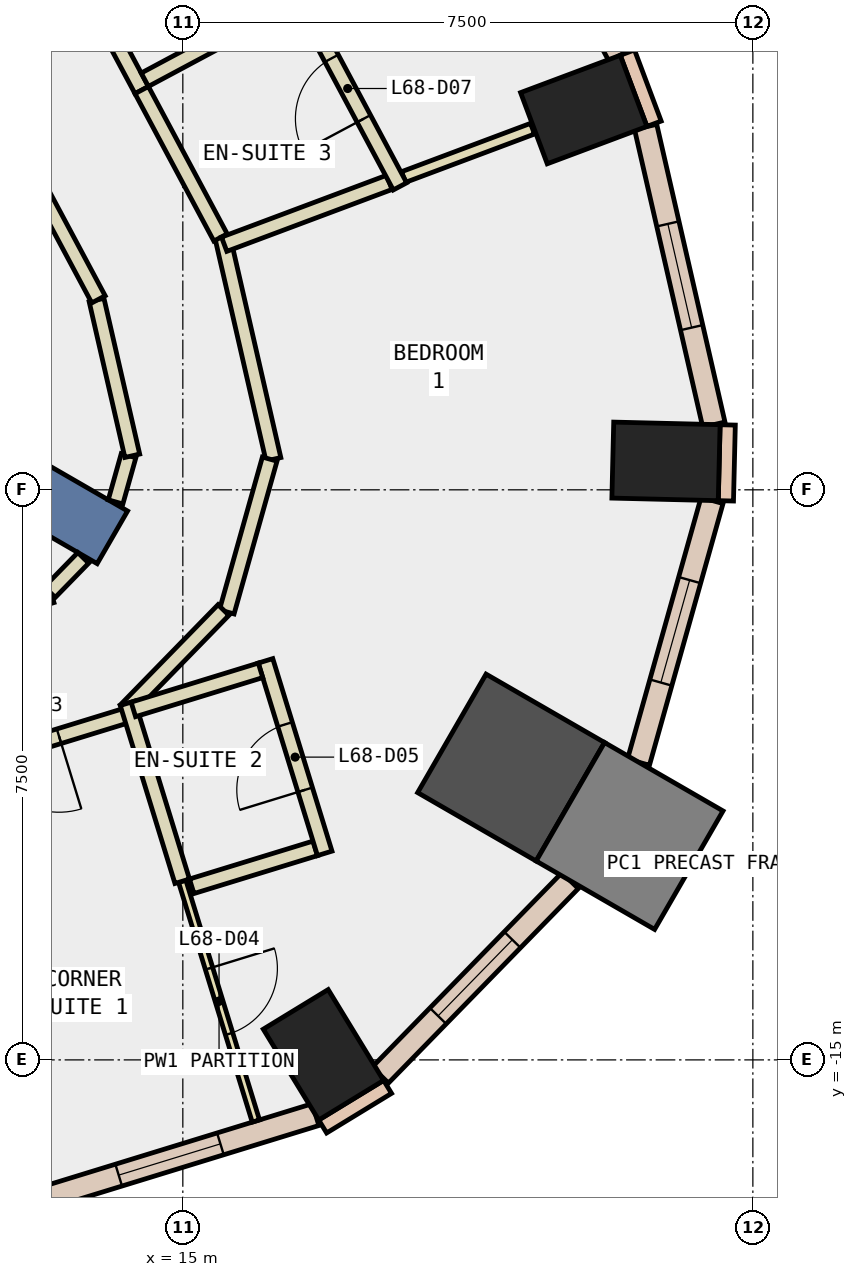
"""IFC4 building model, lengths in metres.
Left out: names, types, materials, properties, quantities, classifications, styles, units other than length and angle.
Written with IfcOpenShell. Run it as: python <this file> out.ifc"""

import sys

from ifc_helpers import new_model, si_unit, direction, frame, frame_2d, origin, origin_2d, place, context, subcontext, project, spatial, rectangle, extrude, element, fill, save


model = new_model("IFC4")
c1 = context("Model", 3, precision=1e-05, world=origin(), true_north=direction((0.0, 1.0)))
c2 = subcontext(c1, "Body", "Model", "MODEL_VIEW")
j1 = project(units=[si_unit("LENGTHUNIT", "METRE"), si_unit("PLANEANGLEUNIT", "RADIAN")], contexts=[c1])
p1 = place(None, origin())
s1 = spatial("IfcSite", under=j1, at=p1, CompositionType="ELEMENT")
p2 = place(p1, origin())
s2 = spatial("IfcBuilding", under=s1, at=p2, CompositionType="ELEMENT")
p3 = place(p2, frame((0.0, 0.0, 293.6)))
s3 = spatial("IfcBuildingStorey", under=s2, at=p3, CompositionType="ELEMENT", Elevation=293.6)
p4 = place(p3, frame((16.85, -14.933, -0.34), z_axis=(0.0, 0.0, 1.0), x_axis=(0.853650808213, 0.520845752251, 0.0)))
e1 = element("IfcColumn", 1, at=p4, inside=s3, PredefinedType="COLUMN", context=c2, shape_type="SweptSolid", body=[
    extrude(rectangle(XDim=1.0, YDim=1.4, at=origin_2d()), origin(), (0.0, 0.0, 1.0), 3.6),
])
p5 = place(p3, frame((19.319, -11.154, -0.34), z_axis=(0.0, 0.0, 1.0), x_axis=(-0.866025403784, 0.5, 0.0)))
e2 = element("IfcColumn", 2, at=p5, inside=s3, PredefinedType="COLUMN", context=c2, shape_type="SweptSolid", body=[
    extrude(rectangle(XDim=1.8, YDim=1.8, at=origin_2d()), origin(), (0.0, 0.0, 1.0), 3.6),
])
for number, where, z_axis, x_axis in (
    (3, (21.357, -7.126, -0.34), (0.0, 0.0, 1.0), (0.024, 1.0, 0.0)),
    (4, (20.275, -2.497, -0.34), (0.0, 0.0, 1.0), (-0.351, 0.936, 0.0)),
):
    element("IfcColumn", number, at=place(p3, frame(where, z_axis=z_axis, x_axis=x_axis)), inside=s3, PredefinedType="COLUMN", context=c2, shape_type="SweptSolid", body=[
        extrude(rectangle(XDim=1.0, YDim=1.4, at=origin_2d()), origin(), (0.0, 0.0, 1.0), 3.6),
    ])
p6 = place(p3, frame((20.878, -12.054, -0.34), z_axis=(0.0, 0.0, 1.0), x_axis=(-0.866025403784, 0.5, 0.0)))
e5 = element("IfcColumn", 5, at=p6, inside=s3, PredefinedType="COLUMN", context=c2, shape_type="SweptSolid", body=[
    extrude(rectangle(XDim=1.8, YDim=1.8, at=origin_2d()), origin(), (0.0, 0.0, 1.0), 3.6),
])
p7 = place(p3, frame((6.279, -3.625, -0.34), z_axis=(0.0, 0.0, 1.0), x_axis=(0.866017533419, -0.500013631625, 0.0)))
e6 = element("IfcWall", 6, at=p7, inside=s3, PredefinedType="SHEAR", context=c2, shape_type="SweptSolid", body=[
    extrude(rectangle(XDim=9.0, YDim=0.8, at=frame_2d((4.5, 0.0))), origin(), (0.0, 0.0, 1.0), 3.6),
])
p8 = place(p3, frame((21.2, -2.684, 0.0), z_axis=(0.0, 0.0, 1.0), x_axis=(-0.350962844851, 0.936389385637, 0.0)))
e7 = element("IfcWall", 7, at=p8, inside=s3, PredefinedType="STANDARD", context=c2, shape_type="SweptSolid", body=[
    extrude(rectangle(XDim=1.0, YDim=0.2, at=frame_2d((0.5, 0.0))), origin(), (0.0, 0.0, 1.0), 3.26),
])
p9 = place(p3, frame((16.84, -15.876, 0.0), z_axis=(0.0, 0.0, 1.0), x_axis=(0.853679739553, 0.520798331677, 0.0)))
e8 = element("IfcWall", 8, at=p9, inside=s3, PredefinedType="STANDARD", context=c2, shape_type="SweptSolid", body=[
    extrude(rectangle(XDim=1.0, YDim=0.2, at=frame_2d((0.5, 0.0))), origin(), (0.0, 0.0, 1.0), 3.26),
])
p10 = place(p3, frame((22.145, -7.645, 0.0), z_axis=(0.0, 0.0, 1.0), x_axis=(0.023942303888, 0.999713341956, 0.0)))
e9 = element("IfcWall", 9, at=p10, inside=s3, PredefinedType="STANDARD", context=c2, shape_type="SweptSolid", body=[
    extrude(rectangle(XDim=0.999, YDim=0.2, at=frame_2d((0.5, 0.0))), origin(), (0.0, 0.0, 1.0), 3.26),
])
p11 = place(p3, frame((12.904, -16.901, 0.0), z_axis=(0.0, 0.0, 1.0), x_axis=(0.955866957005, 0.293799864716, 0.0)))
e10 = element("IfcWall", 10, at=p11, inside=s3, PredefinedType="STANDARD", context=c2, shape_type="SweptSolid", body=[
    extrude(rectangle(XDim=4.02, YDim=0.3, at=frame_2d((2.01, 0.0))), origin(), (0.0, 0.0, 1.0), 3.26),
])
p12 = place(p11, frame((1.31, 0.0, 0.9)))
e11 = element("IfcOpeningElement", 11, at=p12, cuts=e10, PredefinedType="OPENING", context=c2, shape_type="SweptSolid", body=[
    extrude(rectangle(XDim=1.4, YDim=2.0, at=frame_2d((0.7, 1.0))), frame((0.0, 0.16, 0.0), z_axis=(0.0, -1.0, 0.0), x_axis=(1.0, 0.0, 0.0)), (0.0, 0.0, 1.0), 0.32),
])
p13 = place(p3, frame((17.598, -15.2, 0.0), z_axis=(0.0, 0.0, 1.0), x_axis=(0.698555868355, 0.715555517614, 0.0)))
e12 = element("IfcWall", 12, at=p13, inside=s3, PredefinedType="STANDARD", context=c2, shape_type="SweptSolid", body=[
    extrude(rectangle(XDim=3.576, YDim=0.3, at=frame_2d((1.788, 0.0))), origin(), (0.0, 0.0, 1.0), 3.26),
])
p14 = place(p13, frame((1.088, 0.0, 0.9)))
e13 = element("IfcOpeningElement", 13, at=p14, cuts=e12, PredefinedType="OPENING", context=c2, shape_type="SweptSolid", body=[
    extrude(rectangle(XDim=1.4, YDim=2.0, at=frame_2d((0.7, 1.0))), frame((0.0, 0.16, 0.0), z_axis=(0.0, -1.0, 0.0), x_axis=(1.0, 0.0, 0.0)), (0.0, 0.0, 1.0), 0.32),
])
p15 = place(p3, frame((20.995, -11.083, 0.0), z_axis=(0.0, 0.0, 1.0), x_axis=(0.270589405397, 0.962694849725, 0.0)))
e14 = element("IfcWall", 14, at=p15, inside=s3, PredefinedType="STANDARD", context=c2, shape_type="SweptSolid", body=[
    extrude(rectangle(XDim=3.577, YDim=0.3, at=frame_2d((1.788, 0.0))), origin(), (0.0, 0.0, 1.0), 3.26),
])
p16 = place(p15, frame((1.088, 0.0, 0.9)))
e15 = element("IfcOpeningElement", 15, at=p16, cuts=e14, PredefinedType="OPENING", context=c2, shape_type="SweptSolid", body=[
    extrude(rectangle(XDim=1.4, YDim=2.0, at=frame_2d((0.7, 1.0))), frame((0.0, 0.16, 0.0), z_axis=(0.0, -1.0, 0.0), x_axis=(1.0, 0.0, 0.0)), (0.0, 0.0, 1.0), 0.32),
])
p17 = place(p3, frame((21.987, -6.642, 0.0), z_axis=(0.0, 0.0, 1.0), x_axis=(-0.223448307338, 0.974715781112, 0.0)))
e16 = element("IfcWall", 16, at=p17, inside=s3, PredefinedType="STANDARD", context=c2, shape_type="SweptSolid", body=[
    extrude(rectangle(XDim=4.019, YDim=0.3, at=frame_2d((2.009, 0.0))), origin(), (0.0, 0.0, 1.0), 3.26),
])
p18 = place(p17, frame((1.309, 0.0, 0.9)))
e17 = element("IfcOpeningElement", 17, at=p18, cuts=e16, PredefinedType="OPENING", context=c2, shape_type="SweptSolid", body=[
    extrude(rectangle(XDim=1.4, YDim=2.0, at=frame_2d((0.7, 1.0))), frame((0.0, 0.16, 0.0), z_axis=(0.0, -1.0, 0.0), x_axis=(1.0, 0.0, 0.0)), (0.0, 0.0, 1.0), 0.32),
])
p19 = place(p3, frame((20.739, -1.79, 0.0), z_axis=(0.0, 0.0, 1.0), x_axis=(-0.471789353675, 0.881711293882, 0.0)))
e18 = element("IfcWall", 18, at=p19, inside=s3, PredefinedType="STANDARD", context=c2, shape_type="SweptSolid", body=[
    extrude(rectangle(XDim=7.277, YDim=0.3, at=frame_2d((3.638, 0.0))), origin(), (0.0, 0.0, 1.0), 3.26),
])
p20 = place(p19, frame((0.719, 0.0, 0.9)))
e19 = element("IfcOpeningElement", 19, at=p20, cuts=e18, PredefinedType="OPENING", context=c2, shape_type="SweptSolid", body=[
    extrude(rectangle(XDim=2.2, YDim=2.0, at=frame_2d((1.1, 1.0))), frame((0.0, 0.16, 0.0), z_axis=(0.0, -1.0, 0.0), x_axis=(1.0, 0.0, 0.0)), (0.0, 0.0, 1.0), 0.32),
])
p21 = place(p19, frame((4.358, 0.0, 0.9)))
e20 = element("IfcOpeningElement", 20, at=p21, cuts=e18, PredefinedType="OPENING", context=c2, shape_type="SweptSolid", body=[
    extrude(rectangle(XDim=2.2, YDim=2.0, at=frame_2d((1.1, 1.0))), frame((0.0, 0.16, 0.0), z_axis=(0.0, -1.0, 0.0), x_axis=(1.0, 0.0, 0.0)), (0.0, 0.0, 1.0), 0.32),
])
p22 = place(p3, frame((11.239, -9.514, 0.0), z_axis=(0.0, 0.0, 1.0), x_axis=(0.955838469047, 0.293892533234, 0.0)))
e21 = element("IfcWall", 21, at=p22, inside=s3, PredefinedType="PARTITIONING", context=c2, shape_type="SweptSolid", body=[
    extrude(rectangle(XDim=2.13, YDim=0.2, at=frame_2d((1.065, 0.0))), origin(), (0.0, 0.0, 1.0), 3.26),
])
p23 = place(p3, frame((13.25, -8.846, 0.0), z_axis=(0.0, 0.0, 1.0), x_axis=(0.698333537371, 0.715772499181, 0.0)))
e22 = element("IfcWall", 22, at=p23, inside=s3, PredefinedType="PARTITIONING", context=c2, shape_type="SweptSolid", body=[
    extrude(rectangle(XDim=0.63, YDim=0.2, at=frame_2d((0.315, 0.0))), origin(), (0.0, 0.0, 1.0), 3.26),
])
p24 = place(p3, frame((14.115, -7.659, 0.0), z_axis=(0.0, 0.0, 1.0), x_axis=(0.270633612894, 0.96268242301, 0.0)))
e23 = element("IfcWall", 23, at=p24, inside=s3, PredefinedType="PARTITIONING", context=c2, shape_type="SweptSolid", body=[
    extrude(rectangle(XDim=0.632, YDim=0.2, at=frame_2d((0.316, 0.0))), origin(), (0.0, 0.0, 1.0), 3.26),
])
p25 = place(p3, frame((14.335, -7.052, 0.0), z_axis=(0.0, 0.0, 1.0), x_axis=(-0.22355315143, 0.974691740237, 0.0)))
e24 = element("IfcWall", 24, at=p25, inside=s3, PredefinedType="PARTITIONING", context=c2, shape_type="SweptSolid", body=[
    extrude(rectangle(XDim=2.102, YDim=0.2, at=frame_2d((1.051, 0.0))), origin(), (0.0, 0.0, 1.0), 3.26),
])
p26 = place(p3, frame((13.89, -4.994, 0.0), z_axis=(0.0, 0.0, 1.0), x_axis=(-0.471713767504, 0.881751734644, 0.0)))
e25 = element("IfcWall", 25, at=p26, inside=s3, PredefinedType="PARTITIONING", context=c2, shape_type="SweptSolid", body=[
    extrude(rectangle(XDim=7.248, YDim=0.2, at=frame_2d((3.624, 0.0))), origin(), (0.0, 0.0, 1.0), 3.26),
])
p27 = place(p26, frame((2.724, 0.0, 0.0)))
e26 = element("IfcOpeningElement", 26, at=p27, cuts=e25, PredefinedType="OPENING", context=c2, shape_type="SweptSolid", body=[
    extrude(rectangle(XDim=1.8, YDim=2.1, at=frame_2d((0.9, 1.05))), frame((0.0, 0.11, 0.0), z_axis=(0.0, -1.0, 0.0), x_axis=(1.0, 0.0, 0.0)), (0.0, 0.0, 1.0), 0.22),
])
p28 = place(p3, frame((14.243, -10.474, 0.0), z_axis=(0.0, 0.0, 1.0), x_axis=(-0.955937788993, -0.293569316475, 0.0)))
e27 = element("IfcWall", 27, at=p28, inside=s3, PredefinedType="PARTITIONING", context=c2, shape_type="SweptSolid", body=[
    extrude(rectangle(XDim=2.823, YDim=0.2, at=frame_2d((1.412, 0.0))), origin(), (0.0, 0.0, 1.0), 3.26),
])
p29 = place(p28, frame((0.912, 0.0, 0.0)))
e28 = element("IfcOpeningElement", 28, at=p29, cuts=e27, PredefinedType="OPENING", context=c2, shape_type="SweptSolid", body=[
    extrude(rectangle(XDim=1.0, YDim=2.1, at=frame_2d((0.5, 1.05))), frame((0.0, 0.11, 0.0), z_axis=(0.0, -1.0, 0.0), x_axis=(1.0, 0.0, 0.0)), (0.0, 0.0, 1.0), 0.22),
])
p30 = place(p3, frame((15.521, -4.171, 0.0), z_axis=(0.0, 0.0, 1.0), x_axis=(0.223416387785, -0.974723097946, 0.0)))
e29 = element("IfcWall", 29, at=p30, inside=s3, PredefinedType="PARTITIONING", context=c2, shape_type="SweptSolid", body=[
    extrude(rectangle(XDim=3.003, YDim=0.2, at=frame_2d((1.501, 0.0))), origin(), (0.0, 0.0, 1.0), 3.26),
])
p31 = place(p3, frame((16.143, -7.096, 0.0), z_axis=(0.0, 0.0, 1.0), x_axis=(-0.270688011946, -0.962667128445, 0.0)))
e30 = element("IfcWall", 30, at=p31, inside=s3, PredefinedType="PARTITIONING", context=c2, shape_type="SweptSolid", body=[
    extrude(rectangle(XDim=2.088, YDim=0.2, at=frame_2d((1.044, 0.0))), origin(), (0.0, 0.0, 1.0), 3.26),
])
p32 = place(p3, frame((15.535, -9.081, 0.0), z_axis=(0.0, 0.0, 1.0), x_axis=(-0.698342132704, -0.715764113162, 0.0)))
e31 = element("IfcWall", 31, at=p32, inside=s3, PredefinedType="PARTITIONING", context=c2, shape_type="SweptSolid", body=[
    extrude(rectangle(XDim=1.836, YDim=0.2, at=frame_2d((0.918, 0.0))), origin(), (0.0, 0.0, 1.0), 3.26),
])
p33 = place(p3, frame((12.009, 2.338, 0.0), z_axis=(0.0, 0.0, 1.0), x_axis=(0.471771260231, -0.88172097515, 0.0)))
e32 = element("IfcWall", 32, at=p33, inside=s3, PredefinedType="PARTITIONING", context=c2, shape_type="SweptSolid", body=[
    extrude(rectangle(XDim=5.193, YDim=0.2, at=frame_2d((2.597, 0.0))), origin(), (0.0, 0.0, 1.0), 3.26),
])
p34 = place(p33, frame((2.146, 0.0, 0.0)))
e33 = element("IfcOpeningElement", 33, at=p34, cuts=e32, PredefinedType="OPENING", context=c2, shape_type="SweptSolid", body=[
    extrude(rectangle(XDim=1.0, YDim=2.1, at=frame_2d((0.5, 1.05))), frame((0.0, 0.11, 0.0), z_axis=(0.0, -1.0, 0.0), x_axis=(1.0, 0.0, 0.0)), (0.0, 0.0, 1.0), 0.22),
])
p35 = place(p3, frame((14.459, -2.241, 0.0), z_axis=(0.0, 0.0, 1.0), x_axis=(0.471648235011, -0.881786789656, 0.0)))
e34 = element("IfcWall", 34, at=p35, inside=s3, PredefinedType="PARTITIONING", context=c2, shape_type="SweptSolid", body=[
    extrude(rectangle(XDim=2.199, YDim=0.2, at=frame_2d((1.1, 0.0))), origin(), (0.0, 0.0, 1.0), 3.26),
])
p36 = place(p3, frame((14.992, -12.65, 0.0), z_axis=(0.0, 0.0, 1.0), x_axis=(0.293675064948, -0.955905307145, 0.0)))
e35 = element("IfcWall", 35, at=p36, inside=s3, PredefinedType="PARTITIONING", context=c2, shape_type="SweptSolid", body=[
    extrude(rectangle(XDim=3.3, YDim=0.1, at=frame_2d((1.65, 0.0))), origin(), (0.0, 0.0, 1.0), 3.26),
])
p37 = place(p36, frame((1.2, 0.0, 0.0)))
e36 = element("IfcOpeningElement", 36, at=p37, cuts=e35, PredefinedType="OPENING", context=c2, shape_type="SweptSolid", body=[
    extrude(rectangle(XDim=0.9, YDim=2.1, at=frame_2d((0.45, 1.05))), frame((0.0, 0.06, 0.0), z_axis=(0.0, -1.0, 0.0), x_axis=(1.0, 0.0, 0.0)), (0.0, 0.0, 1.0), 0.12),
])
p38 = place(p3, frame((14.272, -10.308, 0.0), z_axis=(0.0, 0.0, 1.0), x_axis=(0.293868765171, -0.955845776711, 0.0)))
e37 = element("IfcWall", 37, at=p38, inside=s3, PredefinedType="PARTITIONING", context=c2, shape_type="SweptSolid", body=[
    extrude(rectangle(XDim=2.45, YDim=0.2, at=frame_2d((1.225, 0.0))), origin(), (0.0, 0.0, 1.0), 3.26),
])
p39 = place(p3, frame((15.117, -12.716, 0.0), z_axis=(0.0, 0.0, 1.0), x_axis=(0.955940341053, 0.293561006177, 0.0)))
e38 = element("IfcWall", 38, at=p39, inside=s3, PredefinedType="PARTITIONING", context=c2, shape_type="SweptSolid", body=[
    extrude(rectangle(XDim=1.7, YDim=0.2, at=frame_2d((0.85, 0.0))), origin(), (0.0, 0.0, 1.0), 3.26),
])
p40 = place(p3, frame((16.867, -12.283, 0.0), z_axis=(0.0, 0.0, 1.0), x_axis=(-0.29397579302, 0.955812865114, 0.0)))
e39 = element("IfcWall", 39, at=p40, inside=s3, PredefinedType="PARTITIONING", context=c2, shape_type="SweptSolid", body=[
    extrude(rectangle(XDim=2.65, YDim=0.2, at=frame_2d((1.325, 0.0))), origin(), (0.0, 0.0, 1.0), 3.26),
])
p41 = place(p40, frame((0.875, 0.0, 0.0)))
e40 = element("IfcOpeningElement", 40, at=p41, cuts=e39, PredefinedType="OPENING", context=c2, shape_type="SweptSolid", body=[
    extrude(rectangle(XDim=0.9, YDim=2.1, at=frame_2d((0.45, 1.05))), frame((0.0, 0.11, 0.0), z_axis=(0.0, -1.0, 0.0), x_axis=(1.0, 0.0, 0.0)), (0.0, 0.0, 1.0), 0.22),
])
p42 = place(p3, frame((16.022, -9.875, 0.0), z_axis=(0.0, 0.0, 1.0), x_axis=(-0.955908620472, -0.293664279932, 0.0)))
e41 = element("IfcWall", 41, at=p42, inside=s3, PredefinedType="PARTITIONING", context=c2, shape_type="SweptSolid", body=[
    extrude(rectangle(XDim=1.75, YDim=0.2, at=frame_2d((0.875, 0.0))), origin(), (0.0, 0.0, 1.0), 3.26),
])
p43 = place(p3, frame((17.904, -3.385, 0.0), z_axis=(0.0, 0.0, 1.0), x_axis=(0.936401128709, 0.350931512054, 0.0)))
e42 = element("IfcWall", 42, at=p43, inside=s3, PredefinedType="PARTITIONING", context=c2, shape_type="SweptSolid", body=[
    extrude(rectangle(XDim=1.812, YDim=0.15, at=frame_2d((0.906, 0.0))), origin(), (0.0, 0.0, 1.0), 3.26),
])
p44 = place(p3, frame((15.544, -4.269, 0.0), z_axis=(0.0, 0.0, 1.0), x_axis=(0.936463142424, 0.350765994477, 0.0)))
e43 = element("IfcWall", 43, at=p44, inside=s3, PredefinedType="PARTITIONING", context=c2, shape_type="SweptSolid", body=[
    extrude(rectangle(XDim=2.321, YDim=0.2, at=frame_2d((1.16, 0.0))), origin(), (0.0, 0.0, 1.0), 3.26),
])
p45 = place(p3, frame((17.857, -3.508, 0.0), z_axis=(0.0, 0.0, 1.0), x_axis=(-0.47112614664, 0.882065844454, 0.0)))
e44 = element("IfcWall", 44, at=p45, inside=s3, PredefinedType="PARTITIONING", context=c2, shape_type="SweptSolid", body=[
    extrude(rectangle(XDim=2.921, YDim=0.2, at=frame_2d((1.46, 0.0))), origin(), (0.0, 0.0, 1.0), 3.26),
])
p46 = place(p45, frame((1.01, 0.0, 0.0)))
e45 = element("IfcOpeningElement", 45, at=p46, cuts=e44, PredefinedType="OPENING", context=c2, shape_type="SweptSolid", body=[
    extrude(rectangle(XDim=0.9, YDim=2.1, at=frame_2d((0.45, 1.05))), frame((0.0, 0.11, 0.0), z_axis=(0.0, -1.0, 0.0), x_axis=(1.0, 0.0, 0.0)), (0.0, 0.0, 1.0), 0.22),
])
p47 = place(p3, frame((16.44, -1.067, 0.0), z_axis=(0.0, 0.0, 1.0), x_axis=(-0.881700916894, -0.471808746367, 0.0)))
e46 = element("IfcWall", 46, at=p47, inside=s3, PredefinedType="PARTITIONING", context=c2, shape_type="SweptSolid", body=[
    extrude(rectangle(XDim=2.2, YDim=0.2, at=frame_2d((1.1, 0.0))), origin(), (0.0, 0.0, 1.0), 3.26),
])
p48 = place(p12, origin())
e47 = element("IfcWindow", 47, at=p48, inside=s3, PartitioningType="SINGLE_PANEL", PredefinedType="WINDOW", context=c2, shape_type="SweptSolid", body=[
    extrude(rectangle(XDim=1.4, YDim=2.0, at=frame_2d((0.7, 1.0))), frame((0.0, 0.03, 0.0), z_axis=(0.0, -1.0, 0.0), x_axis=(1.0, 0.0, 0.0)), (0.0, 0.0, 1.0), 0.06),
])
fill(e11, e47)
p49 = place(p14, origin())
e48 = element("IfcWindow", 48, at=p49, inside=s3, PartitioningType="SINGLE_PANEL", PredefinedType="WINDOW", context=c2, shape_type="SweptSolid", body=[
    extrude(rectangle(XDim=1.4, YDim=2.0, at=frame_2d((0.7, 1.0))), frame((0.0, 0.03, 0.0), z_axis=(0.0, -1.0, 0.0), x_axis=(1.0, 0.0, 0.0)), (0.0, 0.0, 1.0), 0.06),
])
fill(e13, e48)
p50 = place(p16, origin())
e49 = element("IfcWindow", 49, at=p50, inside=s3, PartitioningType="SINGLE_PANEL", PredefinedType="WINDOW", context=c2, shape_type="SweptSolid", body=[
    extrude(rectangle(XDim=1.4, YDim=2.0, at=frame_2d((0.7, 1.0))), frame((0.0, 0.03, 0.0), z_axis=(0.0, -1.0, 0.0), x_axis=(1.0, 0.0, 0.0)), (0.0, 0.0, 1.0), 0.06),
])
fill(e15, e49)
p51 = place(p18, origin())
e50 = element("IfcWindow", 50, at=p51, inside=s3, PartitioningType="SINGLE_PANEL", PredefinedType="WINDOW", context=c2, shape_type="SweptSolid", body=[
    extrude(rectangle(XDim=1.4, YDim=2.0, at=frame_2d((0.7, 1.0))), frame((0.0, 0.03, 0.0), z_axis=(0.0, -1.0, 0.0), x_axis=(1.0, 0.0, 0.0)), (0.0, 0.0, 1.0), 0.06),
])
fill(e17, e50)
p52 = place(p29, origin())
e51 = element("IfcDoor", 51, at=p52, inside=s3, OperationType="SINGLE_SWING_LEFT", PredefinedType="DOOR", context=c2, shape_type="SweptSolid", body=[
    extrude(rectangle(XDim=1.0, YDim=2.1, at=frame_2d((0.5, 1.05))), frame((0.0, 0.025, 0.0), z_axis=(0.0, -1.0, 0.0), x_axis=(1.0, 0.0, 0.0)), (0.0, 0.0, 1.0), 0.05),
])
fill(e28, e51)
p53 = place(p37, origin())
e52 = element("IfcDoor", 52, at=p53, inside=s3, OperationType="SINGLE_SWING_LEFT", PredefinedType="DOOR", context=c2, shape_type="SweptSolid", body=[
    extrude(rectangle(XDim=0.9, YDim=2.1, at=frame_2d((0.45, 1.05))), frame((0.0, 0.025, 0.0), z_axis=(0.0, -1.0, 0.0), x_axis=(1.0, 0.0, 0.0)), (0.0, 0.0, 1.0), 0.05),
])
fill(e36, e52)
p54 = place(p41, origin())
e53 = element("IfcDoor", 53, at=p54, inside=s3, OperationType="SINGLE_SWING_LEFT", PredefinedType="DOOR", context=c2, shape_type="SweptSolid", body=[
    extrude(rectangle(XDim=0.9, YDim=2.1, at=frame_2d((0.45, 1.05))), frame((0.0, 0.025, 0.0), z_axis=(0.0, -1.0, 0.0), x_axis=(1.0, 0.0, 0.0)), (0.0, 0.0, 1.0), 0.05),
])
fill(e40, e53)
p55 = place(p46, origin())
e54 = element("IfcDoor", 54, at=p55, inside=s3, OperationType="SINGLE_SWING_RIGHT", PredefinedType="DOOR", context=c2, shape_type="SweptSolid", body=[
    extrude(rectangle(XDim=0.9, YDim=2.1, at=frame_2d((0.45, 1.05))), frame((0.0, 0.025, 0.0), z_axis=(0.0, -1.0, 0.0), x_axis=(1.0, 0.0, 0.0)), (0.0, 0.0, 1.0), 0.05),
])
fill(e45, e54)
save(model, sys.argv[1])
